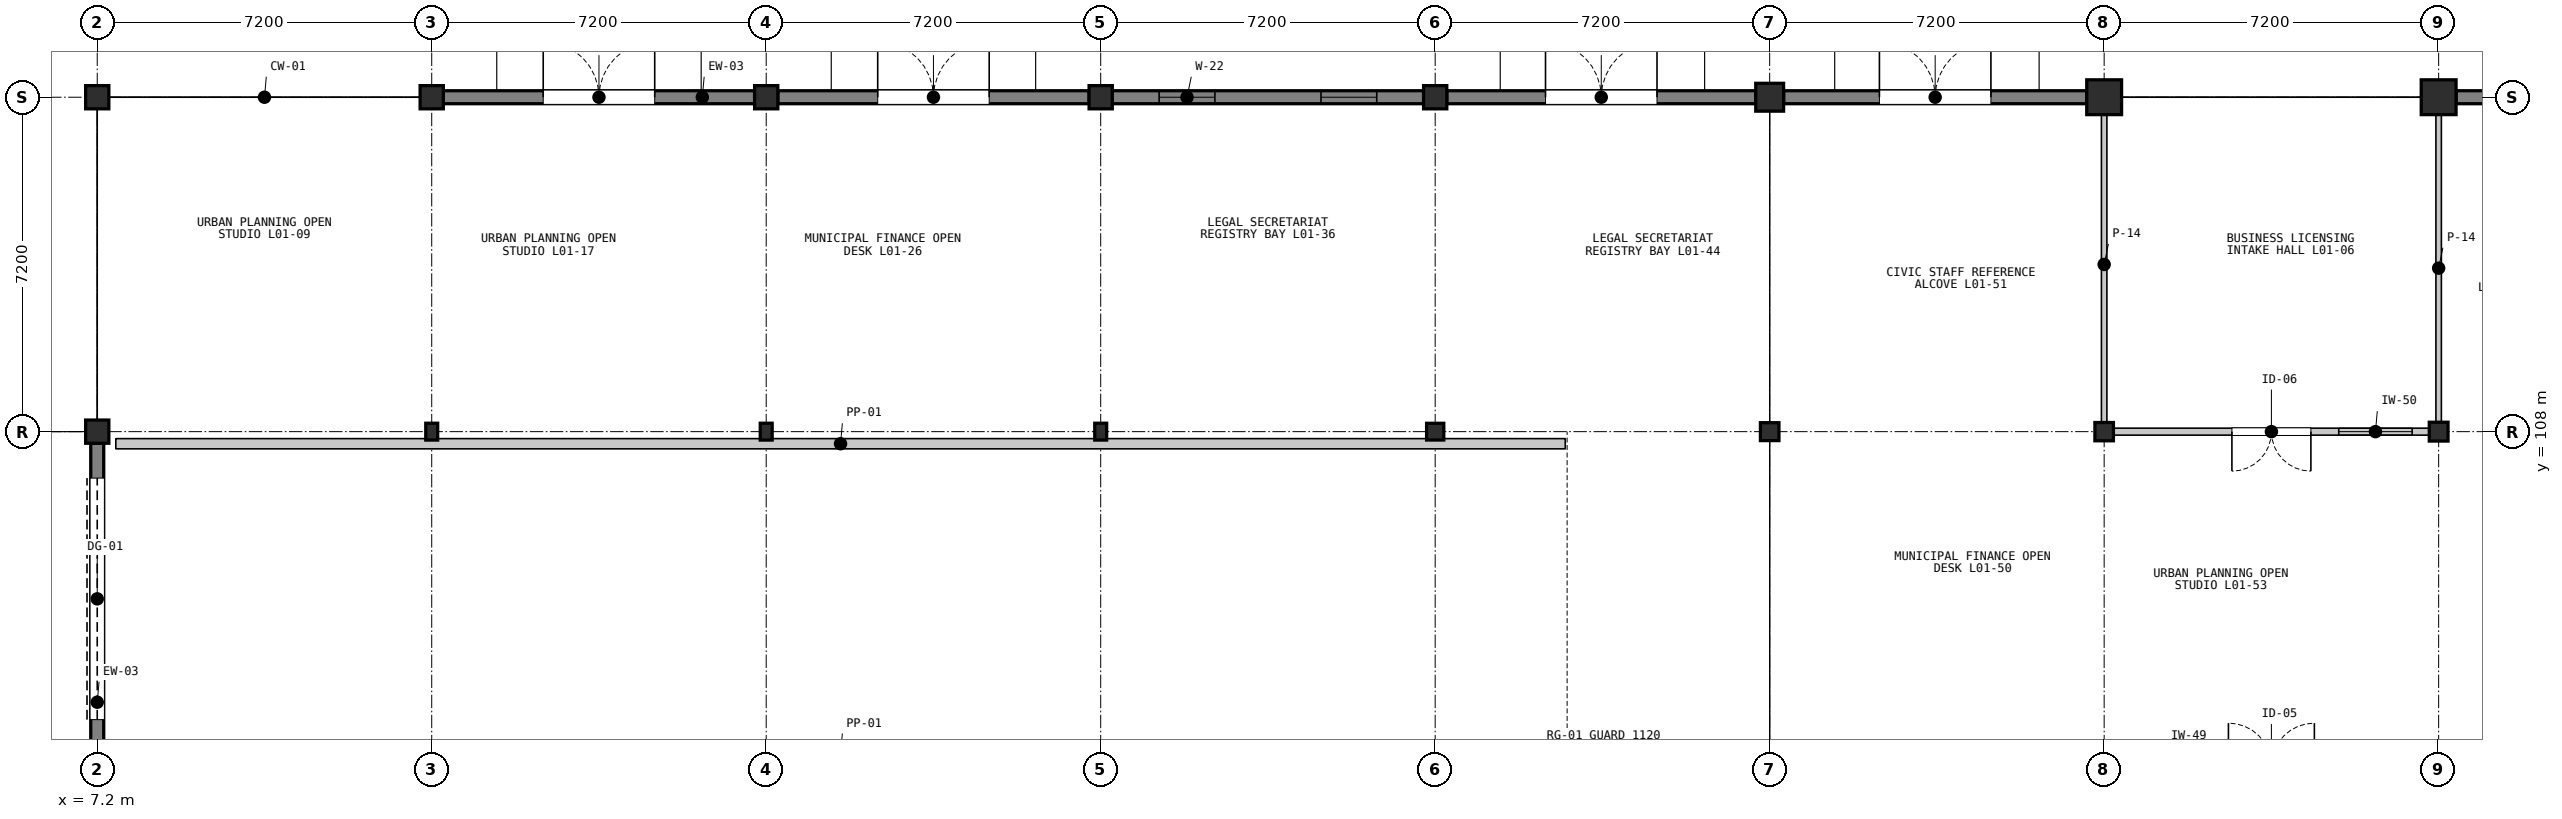
"""IFC4 building model, lengths in metres.
Left out: names, types, materials, properties, quantities, classifications, styles, units other than length and angle.
Written with IfcOpenShell. Run it as: python <this file> out.ifc"""

import sys

from ifc_helpers import new_model, si_unit, direction, frame, frame_2d, origin, origin_2d, place, context, subcontext, project, spatial, rectangle, i_section, extrude, element, fill, save


model = new_model("IFC4")
c1 = context("Model", 3, precision=1e-05, world=origin(), true_north=direction((0.0, 1.0)))
c2 = subcontext(c1, "Body", "Model", "MODEL_VIEW")
j1 = project(units=[si_unit("LENGTHUNIT", "METRE"), si_unit("PLANEANGLEUNIT", "RADIAN")], contexts=[c1])
p1 = place(None, origin())
s1 = spatial("IfcSite", under=j1, at=p1, CompositionType="ELEMENT")
p2 = place(p1, origin())
s2 = spatial("IfcBuilding", under=s1, at=p2, CompositionType="ELEMENT")
p3 = place(p2, origin())
s3 = spatial("IfcBuildingStorey", under=s2, at=p3, CompositionType="ELEMENT", Elevation=0.0)
for number, where, z_axis, x_axis in (
    (1, (7.2, 108.0, 0.0), (0.0, 0.0, 1.0), (1.0, 0.0, 0.0)),
    (2, (7.2, 115.2, 0.0), (0.0, 0.0, 1.0), (1.0, 0.0, 0.0)),
):
    element("IfcColumn", number, at=place(p3, frame(where, z_axis=z_axis, x_axis=x_axis)), inside=s3, PredefinedType="COLUMN", context=c2, shape_type="SweptSolid", body=[
        extrude(rectangle(XDim=0.5, YDim=0.5, at=origin_2d()), origin(), (0.0, 0.0, 1.0), 5.4),
    ])
p4 = place(p3, frame((14.4, 108.0, 0.0), z_axis=(0.0, 0.0, 1.0), x_axis=(1.0, 0.0, 0.0)))
e3 = element("IfcColumn", 3, at=p4, inside=s3, PredefinedType="COLUMN", context=c2, shape_type="SweptSolid", body=[
    extrude(i_section(OverallWidth=0.257, OverallDepth=0.363, WebThickness=0.013, FlangeThickness=0.022, FilletRadius=0.015, at=origin_2d()), origin(), (0.0, 0.0, 1.0), 5.4),
])
p5 = place(p3, frame((14.4, 115.2, 0.0), z_axis=(0.0, 0.0, 1.0), x_axis=(1.0, 0.0, 0.0)))
e4 = element("IfcColumn", 4, at=p5, inside=s3, PredefinedType="COLUMN", context=c2, shape_type="SweptSolid", body=[
    extrude(rectangle(XDim=0.5, YDim=0.5, at=origin_2d()), origin(), (0.0, 0.0, 1.0), 5.4),
])
p6 = place(p3, frame((21.6, 108.0, 0.0), z_axis=(0.0, 0.0, 1.0), x_axis=(1.0, 0.0, 0.0)))
e5 = element("IfcColumn", 5, at=p6, inside=s3, PredefinedType="COLUMN", context=c2, shape_type="SweptSolid", body=[
    extrude(i_section(OverallWidth=0.257, OverallDepth=0.363, WebThickness=0.013, FlangeThickness=0.022, FilletRadius=0.015, at=origin_2d()), origin(), (0.0, 0.0, 1.0), 5.4),
])
p7 = place(p3, frame((21.6, 115.2, 0.0), z_axis=(0.0, 0.0, 1.0), x_axis=(1.0, 0.0, 0.0)))
e6 = element("IfcColumn", 6, at=p7, inside=s3, PredefinedType="COLUMN", context=c2, shape_type="SweptSolid", body=[
    extrude(rectangle(XDim=0.5, YDim=0.5, at=origin_2d()), origin(), (0.0, 0.0, 1.0), 5.4),
])
p8 = place(p3, frame((28.8, 108.0, 0.0), z_axis=(0.0, 0.0, 1.0), x_axis=(1.0, 0.0, 0.0)))
e7 = element("IfcColumn", 7, at=p8, inside=s3, PredefinedType="COLUMN", context=c2, shape_type="SweptSolid", body=[
    extrude(i_section(OverallWidth=0.257, OverallDepth=0.363, WebThickness=0.013, FlangeThickness=0.022, FilletRadius=0.015, at=origin_2d()), origin(), (0.0, 0.0, 1.0), 5.4),
])
p9 = place(p3, frame((28.8, 115.2, 0.0), z_axis=(0.0, 0.0, 1.0), x_axis=(1.0, 0.0, 0.0)))
e8 = element("IfcColumn", 8, at=p9, inside=s3, PredefinedType="COLUMN", context=c2, shape_type="SweptSolid", body=[
    extrude(rectangle(XDim=0.5, YDim=0.5, at=origin_2d()), origin(), (0.0, 0.0, 1.0), 5.4),
])
p10 = place(p3, frame((36.0, 108.0, 0.0), z_axis=(0.0, 0.0, 1.0), x_axis=(1.0, 0.0, 0.0)))
e9 = element("IfcColumn", 9, at=p10, inside=s3, PredefinedType="COLUMN", context=c2, shape_type="SweptSolid", body=[
    extrude(i_section(OverallWidth=0.371, OverallDepth=0.361, WebThickness=0.012, FlangeThickness=0.02, FilletRadius=0.015, at=origin_2d()), origin(), (0.0, 0.0, 1.0), 5.4),
])
p11 = place(p3, frame((36.0, 115.2, 0.0), z_axis=(0.0, 0.0, 1.0), x_axis=(1.0, 0.0, 0.0)))
e10 = element("IfcColumn", 10, at=p11, inside=s3, PredefinedType="COLUMN", context=c2, shape_type="SweptSolid", body=[
    extrude(rectangle(XDim=0.5, YDim=0.5, at=origin_2d()), origin(), (0.0, 0.0, 1.0), 5.4),
])
p12 = place(p3, frame((43.2, 108.0, 0.0), z_axis=(0.0, 0.0, 1.0), x_axis=(1.0, 0.0, 0.0)))
e11 = element("IfcColumn", 11, at=p12, inside=s3, PredefinedType="COLUMN", context=c2, shape_type="SweptSolid", body=[
    extrude(i_section(OverallWidth=0.399, OverallDepth=0.386, WebThickness=0.021, FlangeThickness=0.033, FilletRadius=0.015, at=origin_2d()), origin(), (0.0, 0.0, 1.0), 5.4),
])
p13 = place(p3, frame((43.2, 115.2, 0.0), z_axis=(0.0, 0.0, 1.0), x_axis=(1.0, 0.0, 0.0)))
e12 = element("IfcColumn", 12, at=p13, inside=s3, PredefinedType="COLUMN", context=c2, shape_type="SweptSolid", body=[
    extrude(rectangle(XDim=0.6, YDim=0.6, at=origin_2d()), origin(), (0.0, 0.0, 1.0), 5.4),
])
p14 = place(p3, frame((50.4, 108.0, 0.0), z_axis=(0.0, 0.0, 1.0), x_axis=(1.0, 0.0, 0.0)))
e13 = element("IfcColumn", 13, at=p14, inside=s3, PredefinedType="COLUMN", context=c2, shape_type="SweptSolid", body=[
    extrude(i_section(OverallWidth=0.399, OverallDepth=0.394, WebThickness=0.023, FlangeThickness=0.037, FilletRadius=0.015, at=origin_2d()), origin(), (0.0, 0.0, 1.0), 5.4),
])
p15 = place(p3, frame((50.4, 115.2, 0.0), z_axis=(0.0, 0.0, 1.0), x_axis=(1.0, 0.0, 0.0)))
e14 = element("IfcColumn", 14, at=p15, inside=s3, PredefinedType="COLUMN", context=c2, shape_type="SweptSolid", body=[
    extrude(rectangle(XDim=0.75, YDim=0.75, at=origin_2d()), origin(), (0.0, 0.0, 1.0), 5.4),
])
p16 = place(p3, frame((57.6, 108.0, 0.0), z_axis=(0.0, 0.0, 1.0), x_axis=(1.0, 0.0, 0.0)))
e15 = element("IfcColumn", 15, at=p16, inside=s3, PredefinedType="COLUMN", context=c2, shape_type="SweptSolid", body=[
    extrude(i_section(OverallWidth=0.404, OverallDepth=0.406, WebThickness=0.027, FlangeThickness=0.044, FilletRadius=0.015, at=origin_2d()), origin(), (0.0, 0.0, 1.0), 5.4),
])
p17 = place(p3, frame((57.6, 115.2, 0.0), z_axis=(0.0, 0.0, 1.0), x_axis=(1.0, 0.0, 0.0)))
e16 = element("IfcColumn", 16, at=p17, inside=s3, PredefinedType="COLUMN", context=c2, shape_type="SweptSolid", body=[
    extrude(rectangle(XDim=0.75, YDim=0.75, at=origin_2d()), origin(), (0.0, 0.0, 1.0), 5.4),
])
p18 = place(p3, frame((7.2, 101.05, 0.0), z_axis=(0.0, 0.0, 1.0), x_axis=(0.0, 1.0, 0.0)))
e17 = element("IfcWall", 17, at=p18, inside=s3, PredefinedType="SOLIDWALL", context=c2, shape_type="SweptSolid", body=[
    extrude(rectangle(XDim=6.7, YDim=0.28, at=frame_2d((3.35, 0.0))), origin(), (0.0, 0.0, 1.0), 4.667),
])
p19 = place(p18, frame((0.75, 0.0, 0.0)))
e18 = element("IfcOpeningElement", 18, at=p19, cuts=e17, PredefinedType="OPENING", context=c2, shape_type="SweptSolid", body=[
    extrude(rectangle(XDim=5.2, YDim=2.95, at=frame_2d((2.6, 1.475))), frame((0.0, 0.15, 0.0), z_axis=(0.0, -1.0, 0.0), x_axis=(1.0, 0.0, 0.0)), (0.0, 0.0, 1.0), 0.3),
])
p20 = place(p3, frame((14.65, 115.2, 0.0), z_axis=(0.0, 0.0, 1.0), x_axis=(1.0, 0.0, 0.0)))
e19 = element("IfcWall", 19, at=p20, inside=s3, PredefinedType="SOLIDWALL", context=c2, shape_type="SweptSolid", body=[
    extrude(rectangle(XDim=6.7, YDim=0.28, at=frame_2d((3.35, 0.0))), origin(), (0.0, 0.0, 1.0), 4.598),
])
p21 = place(p20, frame((2.15, 0.0, 0.0)))
e20 = element("IfcOpeningElement", 20, at=p21, cuts=e19, PredefinedType="OPENING", context=c2, shape_type="SweptSolid", body=[
    extrude(rectangle(XDim=2.4, YDim=2.8, at=frame_2d((1.2, 1.4))), frame((0.0, 0.15, 0.0), z_axis=(0.0, -1.0, 0.0), x_axis=(1.0, 0.0, 0.0)), (0.0, 0.0, 1.0), 0.3),
])
p22 = place(p3, frame((21.85, 115.2, 0.0), z_axis=(0.0, 0.0, 1.0), x_axis=(1.0, 0.0, 0.0)))
e21 = element("IfcWall", 21, at=p22, inside=s3, PredefinedType="SOLIDWALL", context=c2, shape_type="SweptSolid", body=[
    extrude(rectangle(XDim=6.7, YDim=0.28, at=frame_2d((3.35, 0.0))), origin(), (0.0, 0.0, 1.0), 4.598),
])
p23 = place(p22, frame((2.15, 0.0, 0.0)))
e22 = element("IfcOpeningElement", 22, at=p23, cuts=e21, PredefinedType="OPENING", context=c2, shape_type="SweptSolid", body=[
    extrude(rectangle(XDim=2.4, YDim=2.8, at=frame_2d((1.2, 1.4))), frame((0.0, 0.15, 0.0), z_axis=(0.0, -1.0, 0.0), x_axis=(1.0, 0.0, 0.0)), (0.0, 0.0, 1.0), 0.3),
])
p24 = place(p3, frame((29.05, 115.2, 0.0), z_axis=(0.0, 0.0, 1.0), x_axis=(1.0, 0.0, 0.0)))
e23 = element("IfcWall", 23, at=p24, inside=s3, PredefinedType="SOLIDWALL", context=c2, shape_type="SweptSolid", body=[
    extrude(rectangle(XDim=6.7, YDim=0.28, at=frame_2d((3.35, 0.0))), origin(), (0.0, 0.0, 1.0), 4.598),
])
p25 = place(p24, frame((1.008, 0.0, 0.95)))
e24 = element("IfcOpeningElement", 24, at=p25, cuts=e23, PredefinedType="OPENING", context=c2, shape_type="SweptSolid", body=[
    extrude(rectangle(XDim=1.2, YDim=1.7, at=frame_2d((0.6, 0.85))), frame((0.0, 0.15, 0.0), z_axis=(0.0, -1.0, 0.0), x_axis=(1.0, 0.0, 0.0)), (0.0, 0.0, 1.0), 0.3),
])
p26 = place(p24, frame((4.492, 0.0, 0.95)))
e25 = element("IfcOpeningElement", 25, at=p26, cuts=e23, PredefinedType="OPENING", context=c2, shape_type="SweptSolid", body=[
    extrude(rectangle(XDim=1.2, YDim=1.7, at=frame_2d((0.6, 0.85))), frame((0.0, 0.15, 0.0), z_axis=(0.0, -1.0, 0.0), x_axis=(1.0, 0.0, 0.0)), (0.0, 0.0, 1.0), 0.3),
])
p27 = place(p3, frame((36.25, 115.2, 0.0), z_axis=(0.0, 0.0, 1.0), x_axis=(1.0, 0.0, 0.0)))
e26 = element("IfcWall", 26, at=p27, inside=s3, PredefinedType="SOLIDWALL", context=c2, shape_type="SweptSolid", body=[
    extrude(rectangle(XDim=6.65, YDim=0.28, at=frame_2d((3.325, 0.0))), origin(), (0.0, 0.0, 1.0), 4.598),
])
p28 = place(p27, frame((2.125, 0.0, 0.0)))
e27 = element("IfcOpeningElement", 27, at=p28, cuts=e26, PredefinedType="OPENING", context=c2, shape_type="SweptSolid", body=[
    extrude(rectangle(XDim=2.4, YDim=2.8, at=frame_2d((1.2, 1.4))), frame((0.0, 0.15, 0.0), z_axis=(0.0, -1.0, 0.0), x_axis=(1.0, 0.0, 0.0)), (0.0, 0.0, 1.0), 0.3),
])
p29 = place(p3, frame((43.5, 115.2, 0.0), z_axis=(0.0, 0.0, 1.0), x_axis=(1.0, 0.0, 0.0)))
e28 = element("IfcWall", 28, at=p29, inside=s3, PredefinedType="SOLIDWALL", context=c2, shape_type="SweptSolid", body=[
    extrude(rectangle(XDim=6.525, YDim=0.28, at=frame_2d((3.262, 0.0))), origin(), (0.0, 0.0, 1.0), 4.598),
])
p30 = place(p29, frame((2.062, 0.0, 0.0)))
e29 = element("IfcOpeningElement", 29, at=p30, cuts=e28, PredefinedType="OPENING", context=c2, shape_type="SweptSolid", body=[
    extrude(rectangle(XDim=2.4, YDim=2.8, at=frame_2d((1.2, 1.4))), frame((0.0, 0.15, 0.0), z_axis=(0.0, -1.0, 0.0), x_axis=(1.0, 0.0, 0.0)), (0.0, 0.0, 1.0), 0.3),
])
p31 = place(p3, frame((57.975, 115.2, 0.0), z_axis=(0.0, 0.0, 1.0), x_axis=(1.0, 0.0, 0.0)))
e30 = element("IfcWall", 30, at=p31, inside=s3, PredefinedType="SOLIDWALL", context=c2, shape_type="SweptSolid", body=[
    extrude(rectangle(XDim=6.45, YDim=0.28, at=frame_2d((3.225, 0.0))), origin(), (0.0, 0.0, 1.0), 4.598),
])
p32 = place(p31, frame((2.025, 0.0, 0.0)))
e31 = element("IfcOpeningElement", 31, at=p32, cuts=e30, PredefinedType="OPENING", context=c2, shape_type="SweptSolid", body=[
    extrude(rectangle(XDim=2.4, YDim=2.8, at=frame_2d((1.2, 1.4))), frame((0.0, 0.15, 0.0), z_axis=(0.0, -1.0, 0.0), x_axis=(1.0, 0.0, 0.0)), (0.0, 0.0, 1.0), 0.3),
])
p33 = place(p3, frame((7.6, 107.74, 0.0), z_axis=(0.0, 0.0, 1.0), x_axis=(1.0, 0.0, 0.0)))
e32 = element("IfcWall", 32, at=p33, inside=s3, PredefinedType="PARAPET", context=c2, shape_type="SweptSolid", body=[
    extrude(rectangle(XDim=31.2, YDim=0.22, at=frame_2d((15.6, 0.0))), origin(), (0.0, 0.0, 1.0), 1.15),
])
p34 = place(p3, frame((57.48, 108.0, 0.0), z_axis=(0.0, 0.0, 1.0), x_axis=(-1.0, 0.0, 0.0)))
e33 = element("IfcWall", 33, at=p34, inside=s3, PredefinedType="PARTITIONING", context=c2, shape_type="SweptSolid", body=[
    extrude(rectangle(XDim=6.96, YDim=0.15, at=frame_2d((3.48, 0.0))), origin(), (0.0, 0.0, 1.0), 4.588),
])
p35 = place(p34, frame((2.63, 0.0, 0.0)))
e34 = element("IfcOpeningElement", 34, at=p35, cuts=e33, PredefinedType="OPENING", context=c2, shape_type="SweptSolid", body=[
    extrude(rectangle(XDim=1.7, YDim=2.35, at=frame_2d((0.85, 1.175))), frame((0.0, 0.085, 0.0), z_axis=(0.0, -1.0, 0.0), x_axis=(1.0, 0.0, 0.0)), (0.0, 0.0, 1.0), 0.17),
])
p36 = place(p34, frame((0.45, 0.0, 1.05)))
e35 = element("IfcOpeningElement", 35, at=p36, cuts=e33, PredefinedType="OPENING", context=c2, shape_type="SweptSolid", body=[
    extrude(rectangle(XDim=1.58, YDim=1.48, at=frame_2d((0.79, 0.74))), frame((0.0, 0.085, 0.0), z_axis=(0.0, -1.0, 0.0), x_axis=(1.0, 0.0, 0.0)), (0.0, 0.0, 1.0), 0.17),
])
p37 = place(p3, frame((50.4, 108.12, 0.0), z_axis=(0.0, 0.0, 1.0), x_axis=(0.0, 1.0, 0.0)))
e36 = element("IfcWall", 36, at=p37, inside=s3, PredefinedType="PARTITIONING", context=c2, shape_type="SweptSolid", body=[
    extrude(rectangle(XDim=6.96, YDim=0.118, at=frame_2d((3.48, 0.0))), origin(), (0.0, 0.0, 1.0), 4.588),
])
p38 = place(p3, frame((57.6, 114.92, 0.0), z_axis=(0.0, 0.0, 1.0), x_axis=(0.0, -1.0, 0.0)))
e37 = element("IfcWall", 37, at=p38, inside=s3, PredefinedType="PARTITIONING", context=c2, shape_type="SweptSolid", body=[
    extrude(rectangle(XDim=6.8, YDim=0.118, at=frame_2d((3.4, 0.0))), origin(), (0.0, 0.0, 1.0), 4.588),
])
p39 = place(p19, origin())
e38 = element("IfcDoor", 38, at=p39, inside=s3, OperationType="ROLLINGUP", PredefinedType="GATE", context=c2, shape_type="SweptSolid", body=[
    extrude(rectangle(XDim=5.2, YDim=2.95, at=frame_2d((2.6, 1.475))), frame((0.0, 0.025, 0.0), z_axis=(0.0, -1.0, 0.0), x_axis=(1.0, 0.0, 0.0)), (0.0, 0.0, 1.0), 0.05),
])
fill(e18, e38)
p40 = place(p21, origin())
e39 = element("IfcDoor", 39, at=p40, inside=s3, OperationType="DOUBLE_DOOR_SINGLE_SWING", PredefinedType="DOOR", context=c2, shape_type="SweptSolid", body=[
    extrude(rectangle(XDim=2.4, YDim=2.8, at=frame_2d((1.2, 1.4))), frame((0.0, 0.025, 0.0), z_axis=(0.0, -1.0, 0.0), x_axis=(1.0, 0.0, 0.0)), (0.0, 0.0, 1.0), 0.05),
])
fill(e20, e39)
p41 = place(p23, origin())
e40 = element("IfcDoor", 40, at=p41, inside=s3, OperationType="DOUBLE_DOOR_SINGLE_SWING", PredefinedType="DOOR", context=c2, shape_type="SweptSolid", body=[
    extrude(rectangle(XDim=2.4, YDim=2.8, at=frame_2d((1.2, 1.4))), frame((0.0, 0.025, 0.0), z_axis=(0.0, -1.0, 0.0), x_axis=(1.0, 0.0, 0.0)), (0.0, 0.0, 1.0), 0.05),
])
fill(e22, e40)
p42 = place(p25, origin())
e41 = element("IfcWindow", 41, at=p42, inside=s3, PartitioningType="SINGLE_PANEL", PredefinedType="WINDOW", context=c2, shape_type="SweptSolid", body=[
    extrude(rectangle(XDim=1.2, YDim=1.7, at=frame_2d((0.6, 0.85))), frame((0.0, 0.03, 0.0), z_axis=(0.0, -1.0, 0.0), x_axis=(1.0, 0.0, 0.0)), (0.0, 0.0, 1.0), 0.06),
])
fill(e24, e41)
p43 = place(p26, origin())
e42 = element("IfcWindow", 42, at=p43, inside=s3, PartitioningType="SINGLE_PANEL", PredefinedType="WINDOW", context=c2, shape_type="SweptSolid", body=[
    extrude(rectangle(XDim=1.2, YDim=1.7, at=frame_2d((0.6, 0.85))), frame((0.0, 0.03, 0.0), z_axis=(0.0, -1.0, 0.0), x_axis=(1.0, 0.0, 0.0)), (0.0, 0.0, 1.0), 0.06),
])
fill(e25, e42)
p44 = place(p28, origin())
e43 = element("IfcDoor", 43, at=p44, inside=s3, OperationType="DOUBLE_DOOR_SINGLE_SWING", PredefinedType="DOOR", context=c2, shape_type="SweptSolid", body=[
    extrude(rectangle(XDim=2.4, YDim=2.8, at=frame_2d((1.2, 1.4))), frame((0.0, 0.025, 0.0), z_axis=(0.0, -1.0, 0.0), x_axis=(1.0, 0.0, 0.0)), (0.0, 0.0, 1.0), 0.05),
])
fill(e27, e43)
p45 = place(p30, origin())
e44 = element("IfcDoor", 44, at=p45, inside=s3, OperationType="DOUBLE_DOOR_SINGLE_SWING", PredefinedType="DOOR", context=c2, shape_type="SweptSolid", body=[
    extrude(rectangle(XDim=2.4, YDim=2.8, at=frame_2d((1.2, 1.4))), frame((0.0, 0.025, 0.0), z_axis=(0.0, -1.0, 0.0), x_axis=(1.0, 0.0, 0.0)), (0.0, 0.0, 1.0), 0.05),
])
fill(e29, e44)
p46 = place(p35, origin())
e45 = element("IfcDoor", 45, at=p46, inside=s3, OperationType="DOUBLE_DOOR_SINGLE_SWING", PredefinedType="DOOR", context=c2, shape_type="SweptSolid", body=[
    extrude(rectangle(XDim=1.7, YDim=2.35, at=frame_2d((0.85, 1.175))), frame((0.0, 0.025, 0.0), z_axis=(0.0, -1.0, 0.0), x_axis=(1.0, 0.0, 0.0)), (0.0, 0.0, 1.0), 0.05),
])
fill(e34, e45)
p47 = place(p36, origin())
e46 = element("IfcWindow", 46, at=p47, inside=s3, PartitioningType="SINGLE_PANEL", PredefinedType="WINDOW", context=c2, shape_type="SweptSolid", body=[
    extrude(rectangle(XDim=1.58, YDim=1.48, at=frame_2d((0.79, 0.74))), frame((0.0, 0.03, 0.0), z_axis=(0.0, -1.0, 0.0), x_axis=(1.0, 0.0, 0.0)), (0.0, 0.0, 1.0), 0.06),
])
fill(e35, e46)
save(model, sys.argv[1])
